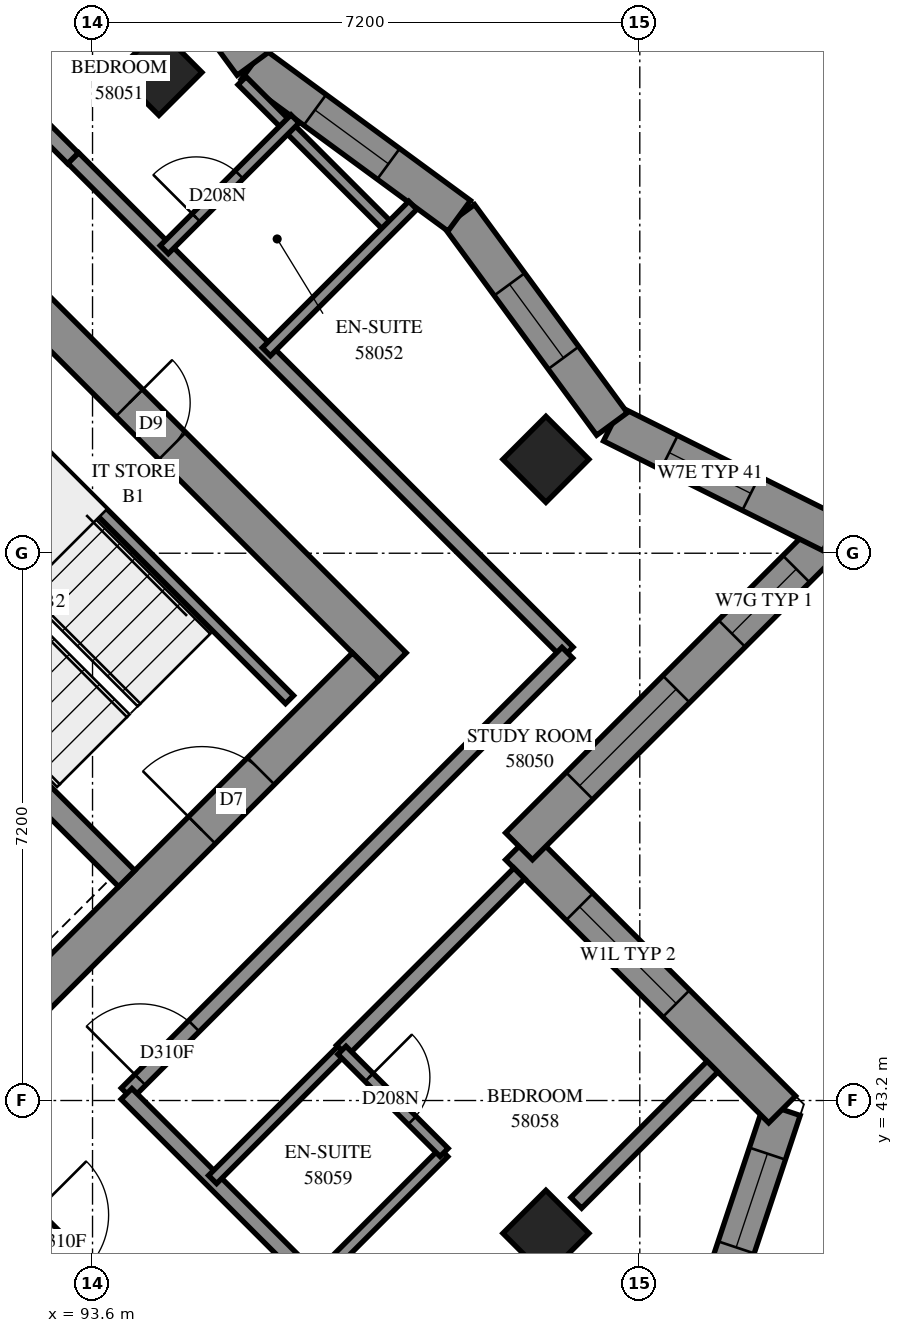
"""IFC4 building model, lengths in metres.
Left out: names, types, materials, properties, quantities, classifications, styles, units other than length and angle.
Written with IfcOpenShell. Run it as: python <this file> out.ifc"""

import sys

from ifc_helpers import new_model, si_unit, direction, frame, frame_2d, origin, origin_2d, place, context, subcontext, project, spatial, polyline, rectangle, outline, extrude, element, fill, save


model = new_model("IFC4")
c1 = context("Model", 3, precision=1e-05, world=origin(), true_north=direction((0.0, 1.0)))
c2 = subcontext(c1, "Body", "Model", "MODEL_VIEW")
j1 = project(units=[si_unit("LENGTHUNIT", "METRE"), si_unit("PLANEANGLEUNIT", "RADIAN")], contexts=[c1])
p1 = place(None, origin())
s1 = spatial("IfcSite", under=j1, at=p1, CompositionType="ELEMENT")
p2 = place(p1, origin())
s2 = spatial("IfcBuilding", under=s1, at=p2, CompositionType="ELEMENT")
p3 = place(p2, frame((0.0, 0.0, 213.4)))
s3 = spatial("IfcBuildingStorey", under=s2, at=p3, CompositionType="ELEMENT", Elevation=213.4)
for number, where, z_axis, x_axis in (
    (1, (94.474, 56.727, 0.0), (0.0, 0.0, 1.0), (0.707, -0.707, 0.0)),
    (2, (99.565, 51.635, 0.0), (0.0, 0.0, 1.0), (0.707, -0.707, 0.0)),
    (3, (99.565, 41.453, 0.0), (0.0, 0.0, 1.0), (0.707, -0.707, 0.0)),
):
    element("IfcColumn", number, at=place(p3, frame(where, z_axis=z_axis, x_axis=x_axis)), inside=s3, PredefinedType="COLUMN", context=c2, shape_type="SweptSolid", body=[
        extrude(rectangle(XDim=0.8, YDim=0.8, at=origin_2d()), origin(), (0.0, 0.0, 1.0), 3.1),
    ])
p4 = place(p3, frame((86.66, 59.802, -0.3), z_axis=(0.0, 0.0, 1.0), x_axis=(0.7071067812, -0.7071067812, 0.0)))
e4 = element("IfcWall", 4, at=p4, inside=s3, PredefinedType="SHEAR", context=c2, shape_type="SweptSolid", body=[
    extrude(rectangle(XDim=15.4, YDim=0.5, at=frame_2d((7.7, 0.0))), origin(), (0.0, 0.0, 1.0), 2.7),
])
p5 = place(p4, frame((10.5, 0.0, 0.3)))
e5 = element("IfcOpeningElement", 5, at=p5, cuts=e4, PredefinedType="OPENING", context=c2, shape_type="SweptSolid", body=[
    extrude(rectangle(XDim=0.8, YDim=2.1, at=frame_2d((0.4, 1.05))), frame((0.0, 0.26, 0.0), z_axis=(0.0, -1.0, 0.0), x_axis=(1.0, 0.0, 0.0)), (0.0, 0.0, 1.0), 0.52),
])
p6 = place(p3, frame((87.013, 38.731, -0.3), z_axis=(0.0, 0.0, 1.0), x_axis=(0.7071067812, 0.7071067812, 0.0)))
e6 = element("IfcWall", 6, at=p6, inside=s3, PredefinedType="SHEAR", context=c2, shape_type="SweptSolid", body=[
    extrude(rectangle(XDim=14.4, YDim=0.5, at=frame_2d((7.2, 0.0))), origin(), (0.0, 0.0, 1.0), 2.7),
])
p7 = place(p6, frame((4.55, 0.0, 0.3)))
e7 = element("IfcOpeningElement", 7, at=p7, cuts=e6, PredefinedType="OPENING", context=c2, shape_type="SweptSolid", body=[
    extrude(rectangle(XDim=1.1, YDim=2.1, at=frame_2d((0.55, 1.05))), frame((0.0, 0.26, 0.0), z_axis=(0.0, -1.0, 0.0), x_axis=(1.0, 0.0, 0.0)), (0.0, 0.0, 1.0), 0.52),
])
p8 = place(p6, frame((11.35, 0.0, 0.3)))
e8 = element("IfcOpeningElement", 8, at=p8, cuts=e6, PredefinedType="OPENING", context=c2, shape_type="SweptSolid", body=[
    extrude(rectangle(XDim=1.1, YDim=2.1, at=frame_2d((0.55, 1.05))), frame((0.0, 0.26, 0.0), z_axis=(0.0, -1.0, 0.0), x_axis=(1.0, 0.0, 0.0)), (0.0, 0.0, 1.0), 0.52),
])
p9 = place(p3, frame((88.958, 51.211, 0.0), z_axis=(0.0, 0.0, 1.0), x_axis=(0.7070998367, -0.7071137256, 0.0)))
e9 = element("IfcWall", 9, at=p9, inside=s3, PredefinedType="SOLIDWALL", context=c2, shape_type="SweptSolid", body=[
    extrude(rectangle(XDim=7.2, YDim=0.3, at=frame_2d((3.6, 0.0))), origin(), (0.0, 0.0, 1.0), 3.1),
])
p10 = place(p3, frame((101.062, 38.252, 0.0), z_axis=(0.0, 0.0, 1.0), x_axis=(0.3162395484, 0.9486793705, 0.0)))
e10 = element("IfcWall", 10, at=p10, inside=s3, PredefinedType="SOLIDWALL", context=c2, shape_type="SweptSolid", body=[
    extrude(outline(polyline([(-0.12, -0.25), (5.247, -0.25), (4.938, 0.25), (0.12, 0.25), (-0.12, -0.25)])), origin(), (0.0, 0.0, 1.0), 3.1),
])
p11 = place(p10, frame((1.68, 0.0, 0.45)))
e11 = element("IfcOpeningElement", 11, at=p11, cuts=e10, PredefinedType="OPENING", context=c2, shape_type="SweptSolid", body=[
    extrude(rectangle(XDim=1.3, YDim=2.5, at=frame_2d((0.65, 1.25))), frame((0.0, 0.26, 0.0), z_axis=(0.0, -1.0, 0.0), x_axis=(1.0, 0.0, 0.0)), (0.0, 0.0, 1.0), 0.52),
])
p12 = place(p10, frame((3.18, 0.0, 0.45)))
e12 = element("IfcOpeningElement", 12, at=p12, cuts=e10, PredefinedType="OPENING", context=c2, shape_type="SweptSolid", body=[
    extrude(rectangle(XDim=1.3, YDim=2.5, at=frame_2d((0.65, 1.25))), frame((0.0, 0.26, 0.0), z_axis=(0.0, -1.0, 0.0), x_axis=(1.0, 0.0, 0.0)), (0.0, 0.0, 1.0), 0.52),
])
p13 = place(p3, frame((102.673, 43.083, 0.0), z_axis=(0.0, 0.0, 1.0), x_axis=(-0.7071067812, 0.7071067812, 0.0)))
e13 = element("IfcWall", 13, at=p13, inside=s3, PredefinedType="SOLIDWALL", context=c2, shape_type="SweptSolid", body=[
    extrude(outline(polyline([(-0.154, -0.25), (4.646, -0.25), (5.146, 0.25), (0.154, 0.25), (-0.154, -0.25)])), origin(), (0.0, 0.0, 1.0), 3.1),
])
p14 = place(p13, frame((1.97, 0.0, 0.6)))
e14 = element("IfcOpeningElement", 14, at=p14, cuts=e13, PredefinedType="OPENING", context=c2, shape_type="SweptSolid", body=[
    extrude(rectangle(XDim=1.8, YDim=1.9, at=frame_2d((0.9, 0.95))), frame((0.0, 0.26, 0.0), z_axis=(0.0, -1.0, 0.0), x_axis=(1.0, 0.0, 0.0)), (0.0, 0.0, 1.0), 0.52),
])
p15 = place(p3, frame((99.211, 46.544, 0.0), z_axis=(0.0, 0.0, 1.0), x_axis=(0.7071153793, 0.7070981829, 0.0)))
e15 = element("IfcWall", 15, at=p15, inside=s3, PredefinedType="SOLIDWALL", context=c2, shape_type="SweptSolid", body=[
    extrude(outline(polyline([(0.25, -0.25), (6.162, -0.25), (5.468, 0.25), (-0.25, 0.25), (0.25, -0.25)])), origin(), (0.0, 0.0, 1.0), 3.1),
])
p16 = place(p15, frame((1.125, 0.0, 0.6)))
e16 = element("IfcOpeningElement", 16, at=p16, cuts=e15, PredefinedType="OPENING", context=c2, shape_type="SweptSolid", body=[
    extrude(rectangle(XDim=1.8, YDim=1.9, at=frame_2d((0.9, 0.95))), frame((0.0, 0.26, 0.0), z_axis=(0.0, -1.0, 0.0), x_axis=(1.0, 0.0, 0.0)), (0.0, 0.0, 1.0), 0.52),
])
p17 = place(p15, frame((3.959, 0.0, 0.6)))
e17 = element("IfcOpeningElement", 17, at=p17, cuts=e15, PredefinedType="OPENING", context=c2, shape_type="SweptSolid", body=[
    extrude(rectangle(XDim=1.2, YDim=1.9, at=frame_2d((0.6, 0.95))), frame((0.0, 0.26, 0.0), z_axis=(0.0, -1.0, 0.0), x_axis=(1.0, 0.0, 0.0)), (0.0, 0.0, 1.0), 0.52),
])
p18 = place(p3, frame((103.323, 50.656, 0.0), z_axis=(0.0, 0.0, 1.0), x_axis=(-0.8944457671, 0.4471764414, 0.0)))
e18 = element("IfcWall", 18, at=p18, inside=s3, PredefinedType="SOLIDWALL", context=c2, shape_type="SweptSolid", body=[
    extrude(outline(polyline([(-0.347, -0.25), (3.169, -0.25), (3.29, 0.25), (0.347, 0.25), (-0.347, -0.25)])), origin(), (0.0, 0.0, 1.0), 3.1),
])
p19 = place(p18, frame((1.188, 0.0, 0.45)))
e19 = element("IfcOpeningElement", 19, at=p19, cuts=e18, PredefinedType="OPENING", context=c2, shape_type="SweptSolid", body=[
    extrude(rectangle(XDim=1.2, YDim=2.5, at=frame_2d((0.6, 1.25))), frame((0.0, 0.26, 0.0), z_axis=(0.0, -1.0, 0.0), x_axis=(1.0, 0.0, 0.0)), (0.0, 0.0, 1.0), 0.52),
])
p20 = place(p3, frame((100.434, 52.1, 0.0), z_axis=(0.0, 0.0, 1.0), x_axis=(-0.5916303667, 0.8062093458, 0.0)))
e20 = element("IfcWall", 20, at=p20, inside=s3, PredefinedType="SOLIDWALL", context=c2, shape_type="SweptSolid", body=[
    extrude(outline(polyline([(0.06, -0.25), (3.435, -0.25), (3.358, 0.25), (-0.06, 0.25), (0.06, -0.25)])), origin(), (0.0, 0.0, 1.0), 3.1),
])
p21 = place(p20, frame((1.079, 0.0, 0.45)))
e21 = element("IfcOpeningElement", 21, at=p21, cuts=e20, PredefinedType="OPENING", context=c2, shape_type="SweptSolid", body=[
    extrude(rectangle(XDim=1.2, YDim=2.5, at=frame_2d((0.6, 1.25))), frame((0.0, 0.26, 0.0), z_axis=(0.0, -1.0, 0.0), x_axis=(1.0, 0.0, 0.0)), (0.0, 0.0, 1.0), 0.52),
])
p22 = place(p3, frame((98.424, 54.839, 0.0), z_axis=(0.0, 0.0, 1.0), x_axis=(-0.806200528, 0.5916423825, 0.0)))
e22 = element("IfcWall", 22, at=p22, inside=s3, PredefinedType="SOLIDWALL", context=c2, shape_type="SweptSolid", body=[
    extrude(outline(polyline([(-0.038, -0.25), (3.337, -0.25), (3.413, 0.25), (0.038, 0.25), (-0.038, -0.25)])), origin(), (0.0, 0.0, 1.0), 3.1),
])
p23 = place(p22, frame((1.155, 0.0, 0.45)))
e23 = element("IfcOpeningElement", 23, at=p23, cuts=e22, PredefinedType="OPENING", context=c2, shape_type="SweptSolid", body=[
    extrude(rectangle(XDim=1.2, YDim=2.5, at=frame_2d((0.6, 1.25))), frame((0.0, 0.26, 0.0), z_axis=(0.0, -1.0, 0.0), x_axis=(1.0, 0.0, 0.0)), (0.0, 0.0, 1.0), 0.52),
])
p24 = place(p3, frame((95.704, 56.836, 0.0), z_axis=(0.0, 0.0, 1.0), x_axis=(-0.5916423825, 0.806200528, 0.0)))
e24 = element("IfcWall", 24, at=p24, inside=s3, PredefinedType="SOLIDWALL", context=c2, shape_type="SweptSolid", body=[
    extrude(outline(polyline([(0.038, -0.25), (3.413, -0.25), (3.337, 0.25), (-0.038, 0.25), (0.038, -0.25)])), origin(), (0.0, 0.0, 1.0), 3.1),
])
p25 = place(p24, frame((1.369, 0.0, 0.45)))
e25 = element("IfcOpeningElement", 25, at=p25, cuts=e24, PredefinedType="OPENING", context=c2, shape_type="SweptSolid", body=[
    extrude(rectangle(XDim=1.2, YDim=2.5, at=frame_2d((0.6, 1.25))), frame((0.0, 0.26, 0.0), z_axis=(0.0, -1.0, 0.0), x_axis=(1.0, 0.0, 0.0)), (0.0, 0.0, 1.0), 0.52),
])
p26 = place(p3, frame((91.313, 53.354, 0.0), z_axis=(0.0, 0.0, 1.0), x_axis=(0.7071140275, -0.7070995348, 0.0)))
e26 = element("IfcWall", 26, at=p26, inside=s3, PredefinedType="PARTITIONING", context=c2, shape_type="SweptSolid", body=[
    extrude(rectangle(XDim=6.9, YDim=0.15, at=frame_2d((3.45, 0.0))), origin(), (0.0, 0.0, 1.0), 3.1),
])
p27 = place(p3, frame((93.346, 55.599, 0.0), z_axis=(0.0, 0.0, 1.0), x_axis=(0.7071067812, -0.7071067812, 0.0)))
e27 = element("IfcWall", 27, at=p27, inside=s3, PredefinedType="PARTITIONING", context=c2, shape_type="SweptSolid", body=[
    extrude(rectangle(XDim=9.201, YDim=0.2, at=frame_2d((4.601, 0.0))), origin(), (0.0, 0.0, 1.0), 3.1),
])
p28 = place(p3, frame((94.049, 43.293, 0.0), z_axis=(0.0, 0.0, 1.0), x_axis=(0.7071067812, 0.7071067812, 0.0)))
e28 = element("IfcWall", 28, at=p28, inside=s3, PredefinedType="PARTITIONING", context=c2, shape_type="SweptSolid", body=[
    extrude(rectangle(XDim=8.2, YDim=0.2, at=frame_2d((4.1, 0.0))), origin(), (0.0, 0.0, 1.0), 3.1),
])
p29 = place(p28, frame((0.252, 0.0, 0.0)))
e29 = element("IfcOpeningElement", 29, at=p29, cuts=e28, PredefinedType="OPENING", context=c2, shape_type="SweptSolid", body=[
    extrude(rectangle(XDim=1.0, YDim=2.1, at=frame_2d((0.5, 1.05))), frame((0.0, 0.11, 0.0), z_axis=(0.0, -1.0, 0.0), x_axis=(1.0, 0.0, 0.0)), (0.0, 0.0, 1.0), 0.22),
])
p30 = place(p3, frame((94.047, 43.287, 0.0), z_axis=(0.0, 0.0, 1.0), x_axis=(0.7071067812, -0.7071067812, 0.0)))
e30 = element("IfcWall", 30, at=p30, inside=s3, PredefinedType="PARTITIONING", context=c2, shape_type="SweptSolid", body=[
    extrude(rectangle(XDim=5.199, YDim=0.2, at=frame_2d((2.599, 0.0))), origin(), (0.0, 0.0, 1.0), 3.1),
])
p31 = place(p30, frame((3.898, 0.0, 0.0)))
e31 = element("IfcOpeningElement", 31, at=p31, cuts=e30, PredefinedType="OPENING", context=c2, shape_type="SweptSolid", body=[
    extrude(rectangle(XDim=0.9, YDim=2.1, at=frame_2d((0.45, 1.05))), frame((0.0, 0.11, 0.0), z_axis=(0.0, -1.0, 0.0), x_axis=(1.0, 0.0, 0.0)), (0.0, 0.0, 1.0), 0.22),
])
p32 = place(p3, frame((92.633, 41.873, 0.0), z_axis=(0.0, 0.0, 1.0), x_axis=(0.7071067812, -0.7071067812, 0.0)))
e32 = element("IfcWall", 32, at=p32, inside=s3, PredefinedType="PARTITIONING", context=c2, shape_type="SweptSolid", body=[
    extrude(rectangle(XDim=5.199, YDim=0.2, at=frame_2d((2.599, 0.0))), origin(), (0.0, 0.0, 1.0), 3.1),
])
p33 = place(p32, frame((0.253, 0.0, 0.0)))
e33 = element("IfcOpeningElement", 33, at=p33, cuts=e32, PredefinedType="OPENING", context=c2, shape_type="SweptSolid", body=[
    extrude(rectangle(XDim=1.0, YDim=2.1, at=frame_2d((0.5, 1.05))), frame((0.0, 0.11, 0.0), z_axis=(0.0, -1.0, 0.0), x_axis=(1.0, 0.0, 0.0)), (0.0, 0.0, 1.0), 0.22),
])
p34 = place(p32, frame((3.948, 0.0, 0.0)))
e34 = element("IfcOpeningElement", 34, at=p34, cuts=e32, PredefinedType="OPENING", context=c2, shape_type="SweptSolid", body=[
    extrude(rectangle(XDim=0.9, YDim=2.1, at=frame_2d((0.45, 1.05))), frame((0.0, 0.11, 0.0), z_axis=(0.0, -1.0, 0.0), x_axis=(1.0, 0.0, 0.0)), (0.0, 0.0, 1.0), 0.22),
])
p35 = place(p3, frame((96.88, 43.856, 0.0), z_axis=(0.0, 0.0, 1.0), x_axis=(0.7074098182, 0.7068036142, 0.0)))
e35 = element("IfcWall", 35, at=p35, inside=s3, PredefinedType="PARTITIONING", context=c2, shape_type="SweptSolid", body=[
    extrude(rectangle(XDim=3.299, YDim=0.2, at=frame_2d((1.65, 0.0))), origin(), (0.0, 0.0, 1.0), 3.1),
])
p36 = place(p3, frame((95.567, 56.617, 0.0), z_axis=(0.0, 0.0, 1.0), x_axis=(0.7071249702, -0.7070885917, 0.0)))
e36 = element("IfcWall", 36, at=p36, inside=s3, PredefinedType="PARTITIONING", context=c2, shape_type="SweptSolid", body=[
    extrude(rectangle(XDim=2.749, YDim=0.15, at=frame_2d((1.374, 0.0))), origin(), (0.0, 0.0, 1.0), 3.1),
])
p37 = place(p3, frame((95.887, 53.051, 0.0), z_axis=(0.0, 0.0, 1.0), x_axis=(0.7071067812, 0.7071067812, 0.0)))
e37 = element("IfcWall", 37, at=p37, inside=s3, PredefinedType="PARTITIONING", context=c2, shape_type="SweptSolid", body=[
    extrude(rectangle(XDim=2.724, YDim=0.15, at=frame_2d((1.362, 0.0))), origin(), (0.0, 0.0, 1.0), 3.1),
])
p38 = place(p3, frame((99.964, 41.854, 0.0), z_axis=(0.0, 0.0, 1.0), x_axis=(0.7071265121, 0.7070870497, 0.0)))
e38 = element("IfcWall", 38, at=p38, inside=s3, PredefinedType="PARTITIONING", context=c2, shape_type="SweptSolid", body=[
    extrude(rectangle(XDim=2.534, YDim=0.2, at=frame_2d((1.267, 0.0))), origin(), (0.0, 0.0, 1.0), 3.1),
])
for number, where, z_axis, x_axis in (
    (39, (96.523, 40.817, 0.0), (0.0, 0.0, 1.0), (0.707, 0.707, 0.0)),
    (40, (95.179, 42.161, 0.0), (0.0, 0.0, 1.0), (0.707, 0.707, 0.0)),
):
    element("IfcWall", number, at=place(p3, frame(where, z_axis=z_axis, x_axis=x_axis)), inside=s3, PredefinedType="PARTITIONING", context=c2, shape_type="SweptSolid", body=[
        extrude(rectangle(XDim=2.401, YDim=0.15, at=frame_2d((1.201, 0.0))), origin(), (0.0, 0.0, 1.0), 3.1),
    ])
p39 = place(p3, frame((94.544, 54.394, 0.0), z_axis=(0.0, 0.0, 1.0), x_axis=(0.7071067812, 0.7071067812, 0.0)))
e41 = element("IfcWall", 41, at=p39, inside=s3, PredefinedType="PARTITIONING", context=c2, shape_type="SweptSolid", body=[
    extrude(rectangle(XDim=2.433, YDim=0.15, at=frame_2d((1.216, 0.0))), origin(), (0.0, 0.0, 1.0), 3.1),
])
p40 = place(p39, frame((0.594, 0.0, 0.0)))
e42 = element("IfcOpeningElement", 42, at=p40, cuts=e41, PredefinedType="OPENING", context=c2, shape_type="SweptSolid", body=[
    extrude(rectangle(XDim=0.8, YDim=2.1, at=frame_2d((0.4, 1.05))), frame((0.0, 0.085, 0.0), z_axis=(0.0, -1.0, 0.0), x_axis=(1.0, 0.0, 0.0)), (0.0, 0.0, 1.0), 0.17),
])
p41 = place(p3, frame((96.881, 43.861, 0.0), z_axis=(0.0, 0.0, 1.0), x_axis=(0.7071067812, -0.7071067812, 0.0)))
e43 = element("IfcWall", 43, at=p41, inside=s3, PredefinedType="PARTITIONING", context=c2, shape_type="SweptSolid", body=[
    extrude(rectangle(XDim=1.901, YDim=0.15, at=frame_2d((0.95, 0.0))), origin(), (0.0, 0.0, 1.0), 3.1),
])
p42 = place(p41, frame((0.505, 0.0, 0.0)))
e44 = element("IfcOpeningElement", 44, at=p42, cuts=e43, PredefinedType="OPENING", context=c2, shape_type="SweptSolid", body=[
    extrude(rectangle(XDim=0.8, YDim=2.1, at=frame_2d((0.4, 1.05))), frame((0.0, 0.085, 0.0), z_axis=(0.0, -1.0, 0.0), x_axis=(1.0, 0.0, 0.0)), (0.0, 0.0, 1.0), 0.17),
])
p43 = place(p3, frame((92.311, 56.627, 0.0), z_axis=(0.0, 0.0, 1.0), x_axis=(0.7077922938, -0.7064206033, 0.0)))
e45 = element("IfcWall", 45, at=p43, inside=s3, PredefinedType="PARTITIONING", context=c2, shape_type="SweptSolid", body=[
    extrude(rectangle(XDim=1.458, YDim=0.2, at=frame_2d((0.729, 0.0))), origin(), (0.0, 0.0, 1.0), 3.1),
])
p44 = place(p12, origin())
e46 = element("IfcWindow", 46, at=p44, inside=s3, PartitioningType="SINGLE_PANEL", PredefinedType="WINDOW", context=c2, shape_type="SweptSolid", body=[
    extrude(rectangle(XDim=1.3, YDim=2.5, at=frame_2d((0.65, 1.25))), frame((0.0, 0.18, 0.0), z_axis=(0.0, -1.0, 0.0), x_axis=(1.0, 0.0, 0.0)), (0.0, 0.0, 1.0), 0.06),
])
fill(e12, e46)
p45 = place(p14, origin())
e47 = element("IfcWindow", 47, at=p45, inside=s3, PartitioningType="SINGLE_PANEL", PredefinedType="WINDOW", context=c2, shape_type="SweptSolid", body=[
    extrude(rectangle(XDim=1.8, YDim=1.9, at=frame_2d((0.9, 0.95))), frame((0.0, 0.18, 0.0), z_axis=(0.0, -1.0, 0.0), x_axis=(1.0, 0.0, 0.0)), (0.0, 0.0, 1.0), 0.06),
])
fill(e14, e47)
p46 = place(p16, origin())
e48 = element("IfcWindow", 48, at=p46, inside=s3, PartitioningType="SINGLE_PANEL", PredefinedType="WINDOW", context=c2, shape_type="SweptSolid", body=[
    extrude(rectangle(XDim=1.8, YDim=1.9, at=frame_2d((0.9, 0.95))), frame((0.0, 0.18, 0.0), z_axis=(0.0, -1.0, 0.0), x_axis=(1.0, 0.0, 0.0)), (0.0, 0.0, 1.0), 0.06),
])
fill(e16, e48)
p47 = place(p17, origin())
e49 = element("IfcWindow", 49, at=p47, inside=s3, PartitioningType="SINGLE_PANEL", PredefinedType="WINDOW", context=c2, shape_type="SweptSolid", body=[
    extrude(rectangle(XDim=1.2, YDim=1.9, at=frame_2d((0.6, 0.95))), frame((0.0, 0.18, 0.0), z_axis=(0.0, -1.0, 0.0), x_axis=(1.0, 0.0, 0.0)), (0.0, 0.0, 1.0), 0.06),
])
fill(e17, e49)
p48 = place(p19, origin())
e50 = element("IfcWindow", 50, at=p48, inside=s3, PartitioningType="SINGLE_PANEL", PredefinedType="WINDOW", context=c2, shape_type="SweptSolid", body=[
    extrude(rectangle(XDim=1.2, YDim=2.5, at=frame_2d((0.6, 1.25))), frame((0.0, 0.18, 0.0), z_axis=(0.0, -1.0, 0.0), x_axis=(1.0, 0.0, 0.0)), (0.0, 0.0, 1.0), 0.06),
])
fill(e19, e50)
p49 = place(p21, origin())
e51 = element("IfcWindow", 51, at=p49, inside=s3, PartitioningType="SINGLE_PANEL", PredefinedType="WINDOW", context=c2, shape_type="SweptSolid", body=[
    extrude(rectangle(XDim=1.2, YDim=2.5, at=frame_2d((0.6, 1.25))), frame((0.0, 0.18, 0.0), z_axis=(0.0, -1.0, 0.0), x_axis=(1.0, 0.0, 0.0)), (0.0, 0.0, 1.0), 0.06),
])
fill(e21, e51)
p50 = place(p23, origin())
e52 = element("IfcWindow", 52, at=p50, inside=s3, PartitioningType="SINGLE_PANEL", PredefinedType="WINDOW", context=c2, shape_type="SweptSolid", body=[
    extrude(rectangle(XDim=1.2, YDim=2.5, at=frame_2d((0.6, 1.25))), frame((0.0, 0.18, 0.0), z_axis=(0.0, -1.0, 0.0), x_axis=(1.0, 0.0, 0.0)), (0.0, 0.0, 1.0), 0.06),
])
fill(e23, e52)
p51 = place(p5, origin())
e53 = element("IfcDoor", 53, at=p51, inside=s3, OperationType="SINGLE_SWING_RIGHT", PredefinedType="DOOR", context=c2, shape_type="SweptSolid", body=[
    extrude(rectangle(XDim=0.8, YDim=2.1, at=frame_2d((0.4, 1.05))), frame((0.0, 0.025, 0.0), z_axis=(0.0, -1.0, 0.0), x_axis=(1.0, 0.0, 0.0)), (0.0, 0.0, 1.0), 0.05),
])
fill(e5, e53)
p52 = place(p8, origin())
e54 = element("IfcDoor", 54, at=p52, inside=s3, OperationType="SINGLE_SWING_RIGHT", PredefinedType="DOOR", context=c2, shape_type="SweptSolid", body=[
    extrude(rectangle(XDim=1.1, YDim=2.1, at=frame_2d((0.55, 1.05))), frame((0.0, 0.025, 0.0), z_axis=(0.0, -1.0, 0.0), x_axis=(1.0, 0.0, 0.0)), (0.0, 0.0, 1.0), 0.05),
])
fill(e8, e54)
p53 = place(p29, origin())
e55 = element("IfcDoor", 55, at=p53, inside=s3, OperationType="SINGLE_SWING_RIGHT", PredefinedType="DOOR", context=c2, shape_type="SweptSolid", body=[
    extrude(rectangle(XDim=1.0, YDim=2.1, at=frame_2d((0.5, 1.05))), frame((0.0, 0.025, 0.0), z_axis=(0.0, -1.0, 0.0), x_axis=(1.0, 0.0, 0.0)), (0.0, 0.0, 1.0), 0.05),
])
fill(e29, e55)
p54 = place(p40, origin())
e56 = element("IfcDoor", 56, at=p54, inside=s3, OperationType="SINGLE_SWING_RIGHT", PredefinedType="DOOR", context=c2, shape_type="SweptSolid", body=[
    extrude(rectangle(XDim=0.8, YDim=2.1, at=frame_2d((0.4, 1.05))), frame((0.0, 0.025, 0.0), z_axis=(0.0, -1.0, 0.0), x_axis=(1.0, 0.0, 0.0)), (0.0, 0.0, 1.0), 0.05),
])
fill(e42, e56)
p55 = place(p33, origin())
e57 = element("IfcDoor", 57, at=p55, inside=s3, OperationType="SINGLE_SWING_RIGHT", PredefinedType="DOOR", context=c2, shape_type="SweptSolid", body=[
    extrude(rectangle(XDim=1.0, YDim=2.1, at=frame_2d((0.5, 1.05))), frame((0.0, 0.025, 0.0), z_axis=(0.0, -1.0, 0.0), x_axis=(1.0, 0.0, 0.0)), (0.0, 0.0, 1.0), 0.05),
])
fill(e33, e57)
p56 = place(p42, origin())
e58 = element("IfcDoor", 58, at=p56, inside=s3, OperationType="SINGLE_SWING_RIGHT", PredefinedType="DOOR", context=c2, shape_type="SweptSolid", body=[
    extrude(rectangle(XDim=0.8, YDim=2.1, at=frame_2d((0.4, 1.05))), frame((0.0, 0.025, 0.0), z_axis=(0.0, -1.0, 0.0), x_axis=(1.0, 0.0, 0.0)), (0.0, 0.0, 1.0), 0.05),
])
fill(e44, e58)
save(model, sys.argv[1])
